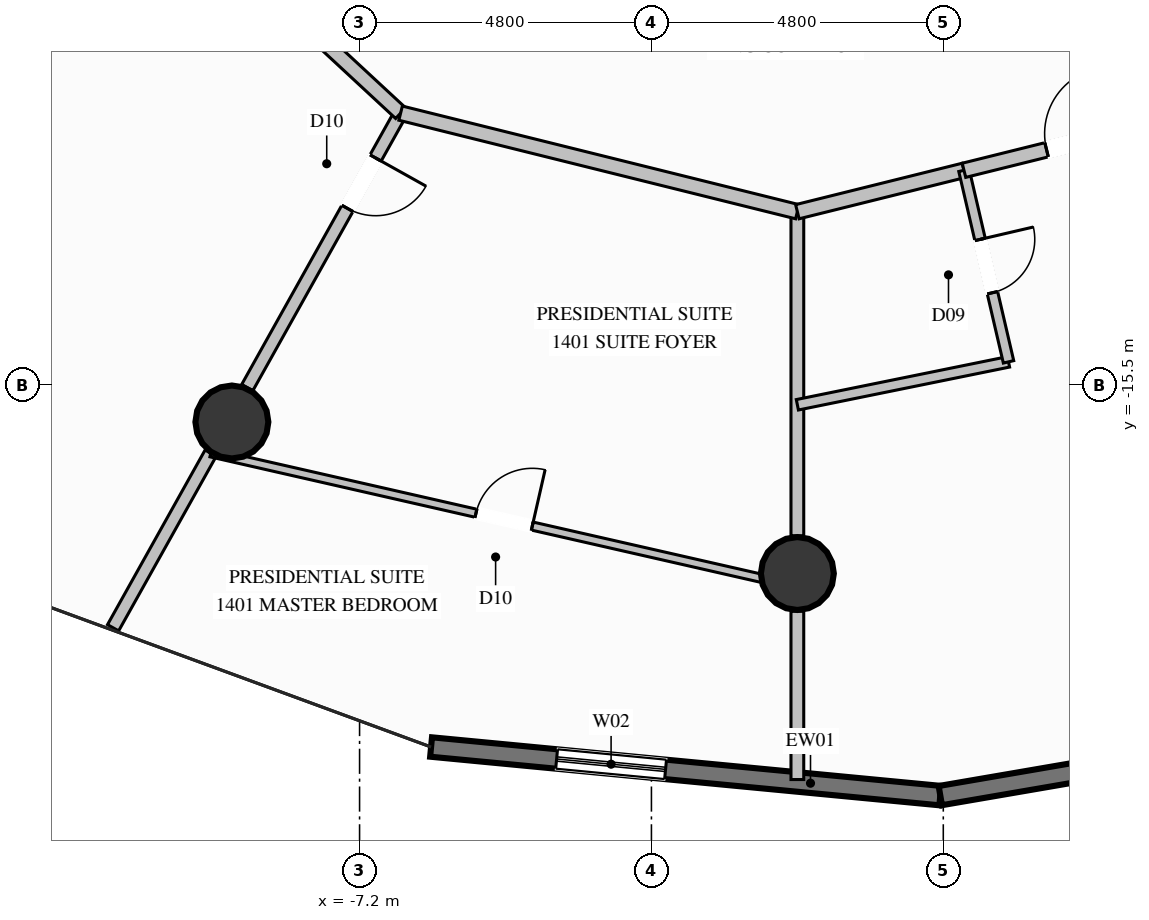
"""IFC4 building model, lengths in metres.
Left out: names, types, materials, properties, quantities, classifications, styles, units other than length and angle.
Written with IfcOpenShell. Run it as: python <this file> out.ifc"""

import sys

from ifc_helpers import new_model, si_unit, direction, frame, frame_2d, origin, origin_2d, place, context, subcontext, project, spatial, rectangle, circle, extrude, element, fill, save


model = new_model("IFC4")
c1 = context("Model", 3, precision=1e-05, world=origin(), true_north=direction((0.0, 1.0)))
c2 = subcontext(c1, "Body", "Model", "MODEL_VIEW")
j1 = project(units=[si_unit("LENGTHUNIT", "METRE"), si_unit("PLANEANGLEUNIT", "RADIAN")], contexts=[c1])
p1 = place(None, origin())
s1 = spatial("IfcSite", under=j1, at=p1, CompositionType="ELEMENT")
p2 = place(p1, origin())
s2 = spatial("IfcBuilding", under=s1, at=p2, CompositionType="ELEMENT")
p3 = place(p2, frame((0.0, 0.0, 53.6)))
s3 = spatial("IfcBuildingStorey", under=s2, at=p3, CompositionType="ELEMENT", Elevation=53.6)
for number, where, z_axis, x_axis in (
    (1, (-9.3, -16.108, 0.0), (0.0, 0.0, 1.0), (1.0, 0.0, 0.0)),
    (2, (0.0, -18.6, 0.0), (0.0, 0.0, 1.0), (1.0, 0.0, 0.0)),
):
    element("IfcColumn", number, at=place(p3, frame(where, z_axis=z_axis, x_axis=x_axis)), inside=s3, PredefinedType="COLUMN", context=c2, shape_type="SweptSolid", body=[
        extrude(circle(Radius=0.6, at=origin_2d()), origin(), (0.0, 0.0, 1.0), 3.6),
    ])
p4 = place(p3, frame((2.351, -22.252, 0.0), z_axis=(0.0, 0.0, 1.0), x_axis=(-0.995479154881, 0.094980272677, 0.0)))
e3 = element("IfcWall", 3, at=p4, inside=s3, PredefinedType="SOLIDWALL", context=c2, shape_type="SweptSolid", body=[
    extrude(rectangle(XDim=8.413, YDim=0.32, at=frame_2d((4.207, 0.0))), origin(), (0.0, 0.0, 1.0), 3.34),
])
p5 = place(p4, frame((4.539, 0.0, 0.35)))
e4 = element("IfcOpeningElement", 4, at=p5, cuts=e3, PredefinedType="OPENING", context=c2, shape_type="SweptSolid", body=[
    extrude(rectangle(XDim=1.8, YDim=2.6, at=frame_2d((0.9, 1.3))), frame((0.0, 0.17, 0.0), z_axis=(0.0, -1.0, 0.0), x_axis=(1.0, 0.0, 0.0)), (0.0, 0.0, 1.0), 0.34),
])
p6 = place(p3, frame((10.383, -20.872, 0.0), z_axis=(0.0, 0.0, 1.0), x_axis=(-0.985561469065, -0.169318016449, 0.0)))
e5 = element("IfcWall", 5, at=p6, inside=s3, PredefinedType="SOLIDWALL", context=c2, shape_type="SweptSolid", body=[
    extrude(rectangle(XDim=8.15, YDim=0.32, at=frame_2d((4.075, 0.0))), origin(), (0.0, 0.0, 1.0), 3.34),
])
p7 = place(p6, frame((3.175, 0.0, 0.35)))
e6 = element("IfcOpeningElement", 6, at=p7, cuts=e5, PredefinedType="OPENING", context=c2, shape_type="SweptSolid", body=[
    extrude(rectangle(XDim=1.8, YDim=2.6, at=frame_2d((0.9, 1.3))), frame((0.0, 0.17, 0.0), z_axis=(0.0, -1.0, 0.0), x_axis=(1.0, 0.0, 0.0)), (0.0, 0.0, 1.0), 0.34),
])
p8 = place(p3, frame((-6.525, -11.029, 0.0), z_axis=(0.0, 0.0, 1.0), x_axis=(-0.487862634596, -0.872920414336, 0.0)))
e7 = element("IfcWall", 7, at=p8, inside=s3, PredefinedType="PARTITIONING", context=c2, shape_type="SweptSolid", body=[
    extrude(rectangle(XDim=5.17, YDim=0.21, at=frame_2d((2.585, 0.0))), origin(), (0.0, 0.0, 1.0), 2.709),
])
p9 = place(p8, frame((0.844, 0.0, 0.0)))
e8 = element("IfcOpeningElement", 8, at=p9, cuts=e7, PredefinedType="OPENING", context=c2, shape_type="SweptSolid", body=[
    extrude(rectangle(XDim=0.95, YDim=2.1, at=frame_2d((0.475, 1.05))), frame((0.0, 0.115, 0.0), z_axis=(0.0, -1.0, 0.0), x_axis=(1.0, 0.0, 0.0)), (0.0, 0.0, 1.0), 0.23),
])
p10 = place(p3, frame((-9.649, -16.62, 0.0), z_axis=(0.0, 0.0, 1.0), x_axis=(-0.487852958735, -0.872925821965, 0.0)))
e9 = element("IfcWall", 9, at=p10, inside=s3, PredefinedType="PARTITIONING", context=c2, shape_type="SweptSolid", body=[
    extrude(rectangle(XDim=3.29, YDim=0.21, at=frame_2d((1.645, 0.0))), origin(), (0.0, 0.0, 1.0), 3.34),
])
p11 = place(p3, frame((0.0, -12.65, 0.0), z_axis=(0.0, 0.0, 1.0), x_axis=(0.0, -1.0, 0.0)))
e10 = element("IfcWall", 10, at=p11, inside=s3, PredefinedType="PARTITIONING", context=c2, shape_type="SweptSolid", body=[
    extrude(rectangle(XDim=5.33, YDim=0.21, at=frame_2d((2.665, 0.0))), origin(), (0.0, 0.0, 1.0), 2.709),
])
p12 = place(p3, frame((0.0, -19.22, 0.0), z_axis=(0.0, 0.0, 1.0), x_axis=(0.0, -1.0, 0.0)))
e11 = element("IfcWall", 11, at=p12, inside=s3, PredefinedType="PARTITIONING", context=c2, shape_type="SweptSolid", body=[
    extrude(rectangle(XDim=2.768, YDim=0.21, at=frame_2d((1.384, 0.0))), origin(), (0.0, 0.0, 1.0), 3.34),
])
p13 = place(p3, frame((-11.302, -6.6, 0.0), z_axis=(0.0, 0.0, 1.0), x_axis=(0.733323191675, -0.679880207501, 0.0)))
e12 = element("IfcWall", 12, at=p13, inside=s3, PredefinedType="PARTITIONING", context=c2, shape_type="SweptSolid", body=[
    extrude(rectangle(XDim=6.514, YDim=0.24, at=frame_2d((3.257, 0.0))), origin(), (0.0, 0.0, 1.0), 3.34),
])
p14 = place(p3, frame((-6.525, -11.029, 0.0), z_axis=(0.0, 0.0, 1.0), x_axis=(0.970504544001, -0.241082828243, 0.0)))
e13 = element("IfcWall", 13, at=p14, inside=s3, PredefinedType="PARTITIONING", context=c2, shape_type="SweptSolid", body=[
    extrude(rectangle(XDim=6.723, YDim=0.24, at=frame_2d((3.362, 0.0))), origin(), (0.0, 0.0, 1.0), 3.34),
])
p15 = place(p3, frame((-9.646, -16.615, 0.0), z_axis=(0.0, 0.0, 1.0), x_axis=(0.975007616146, -0.222171439336, 0.0)))
e14 = element("IfcWall", 14, at=p15, inside=s3, PredefinedType="PARTITIONING", context=c2, shape_type="SweptSolid", body=[
    extrude(rectangle(XDim=9.893, YDim=0.135, at=frame_2d((4.947, 0.0))), origin(), (0.0, 0.0, 1.0), 2.792),
])
p16 = place(p15, frame((4.472, 0.0, 0.0)))
e15 = element("IfcOpeningElement", 15, at=p16, cuts=e14, PredefinedType="OPENING", context=c2, shape_type="SweptSolid", body=[
    extrude(rectangle(XDim=0.95, YDim=2.1, at=frame_2d((0.475, 1.05))), frame((0.0, 0.078, 0.0), z_axis=(0.0, -1.0, 0.0), x_axis=(1.0, 0.0, 0.0)), (0.0, 0.0, 1.0), 0.155),
])
p17 = place(p3, frame((0.0, -12.65, 0.0), z_axis=(0.0, 0.0, 1.0), x_axis=(0.970482346271, 0.241172169986, 0.0)))
e16 = element("IfcWall", 16, at=p17, inside=s3, PredefinedType="PARTITIONING", context=c2, shape_type="SweptSolid", body=[
    extrude(rectangle(XDim=2.823, YDim=0.24, at=frame_2d((1.412, 0.0))), origin(), (0.0, 0.0, 1.0), 3.34),
])
p18 = place(p3, frame((0.0, -15.825, 0.0), z_axis=(0.0, 0.0, 1.0), x_axis=(0.979953078404, 0.199228421986, 0.0)))
e17 = element("IfcWall", 17, at=p18, inside=s3, PredefinedType="PLUMBINGWALL", context=c2, shape_type="SweptSolid", body=[
    extrude(rectangle(XDim=3.544, YDim=0.175, at=frame_2d((1.772, 0.0))), origin(), (0.0, 0.0, 1.0), 3.34),
])
p19 = place(p3, frame((2.74, -11.969, 0.0), z_axis=(0.0, 0.0, 1.0), x_axis=(0.226623417756, -0.97398245699, 0.0)))
e18 = element("IfcWall", 18, at=p19, inside=s3, PredefinedType="PLUMBINGWALL", context=c2, shape_type="SweptSolid", body=[
    extrude(rectangle(XDim=3.234, YDim=0.175, at=frame_2d((1.617, 0.0))), origin(), (0.0, 0.0, 1.0), 3.34),
])
p20 = place(p19, frame((1.167, 0.0, 0.0)))
e19 = element("IfcOpeningElement", 19, at=p20, cuts=e18, PredefinedType="OPENING", context=c2, shape_type="SweptSolid", body=[
    extrude(rectangle(XDim=0.9, YDim=2.1, at=frame_2d((0.45, 1.05))), frame((0.0, 0.098, 0.0), z_axis=(0.0, -1.0, 0.0), x_axis=(1.0, 0.0, 0.0)), (0.0, 0.0, 1.0), 0.195),
])
p21 = place(p3, frame((2.74, -11.969, 0.0), z_axis=(0.0, 0.0, 1.0), x_axis=(0.97052060898, 0.24101814775, 0.0)))
e20 = element("IfcWall", 20, at=p21, inside=s3, PredefinedType="PARTITIONING", context=c2, shape_type="SweptSolid", body=[
    extrude(rectangle(XDim=3.9, YDim=0.24, at=frame_2d((1.95, 0.0))), origin(), (0.0, 0.0, 1.0), 3.34),
])
p22 = place(p21, frame((1.4, 0.0, 0.0)))
e21 = element("IfcOpeningElement", 21, at=p22, cuts=e20, PredefinedType="OPENING", context=c2, shape_type="SweptSolid", body=[
    extrude(rectangle(XDim=1.1, YDim=2.3, at=frame_2d((0.55, 1.15))), frame((0.0, 0.13, 0.0), z_axis=(0.0, -1.0, 0.0), x_axis=(1.0, 0.0, 0.0)), (0.0, 0.0, 1.0), 0.26),
])
p23 = place(p5, origin())
e22 = element("IfcWindow", 22, at=p23, inside=s3, PartitioningType="SINGLE_PANEL", PredefinedType="WINDOW", context=c2, shape_type="SweptSolid", body=[
    extrude(rectangle(XDim=1.8, YDim=2.6, at=frame_2d((0.9, 1.3))), frame((0.0, 0.03, 0.0), z_axis=(0.0, -1.0, 0.0), x_axis=(1.0, 0.0, 0.0)), (0.0, 0.0, 1.0), 0.06),
])
fill(e4, e22)
p24 = place(p9, origin())
e23 = element("IfcDoor", 23, at=p24, inside=s3, OperationType="SINGLE_SWING_LEFT", PredefinedType="DOOR", context=c2, shape_type="SweptSolid", body=[
    extrude(rectangle(XDim=0.95, YDim=2.1, at=frame_2d((0.475, 1.05))), frame((0.0, 0.025, 0.0), z_axis=(0.0, -1.0, 0.0), x_axis=(1.0, 0.0, 0.0)), (0.0, 0.0, 1.0), 0.05),
])
fill(e8, e23)
p25 = place(p16, origin())
e24 = element("IfcDoor", 24, at=p25, inside=s3, OperationType="SINGLE_SWING_RIGHT", PredefinedType="DOOR", context=c2, shape_type="SweptSolid", body=[
    extrude(rectangle(XDim=0.95, YDim=2.1, at=frame_2d((0.475, 1.05))), frame((0.0, 0.025, 0.0), z_axis=(0.0, -1.0, 0.0), x_axis=(1.0, 0.0, 0.0)), (0.0, 0.0, 1.0), 0.05),
])
fill(e15, e24)
p26 = place(p20, origin())
e25 = element("IfcDoor", 25, at=p26, inside=s3, OperationType="SINGLE_SWING_LEFT", PredefinedType="DOOR", context=c2, shape_type="SweptSolid", body=[
    extrude(rectangle(XDim=0.9, YDim=2.1, at=frame_2d((0.45, 1.05))), frame((0.0, 0.025, 0.0), z_axis=(0.0, -1.0, 0.0), x_axis=(1.0, 0.0, 0.0)), (0.0, 0.0, 1.0), 0.05),
])
fill(e19, e25)
p27 = place(p22, origin())
e26 = element("IfcDoor", 26, at=p27, inside=s3, OperationType="SINGLE_SWING_RIGHT", PredefinedType="DOOR", context=c2, shape_type="SweptSolid", body=[
    extrude(rectangle(XDim=1.1, YDim=2.3, at=frame_2d((0.55, 1.15))), frame((0.0, 0.025, 0.0), z_axis=(0.0, -1.0, 0.0), x_axis=(1.0, 0.0, 0.0)), (0.0, 0.0, 1.0), 0.05),
])
fill(e21, e26)
save(model, sys.argv[1])
